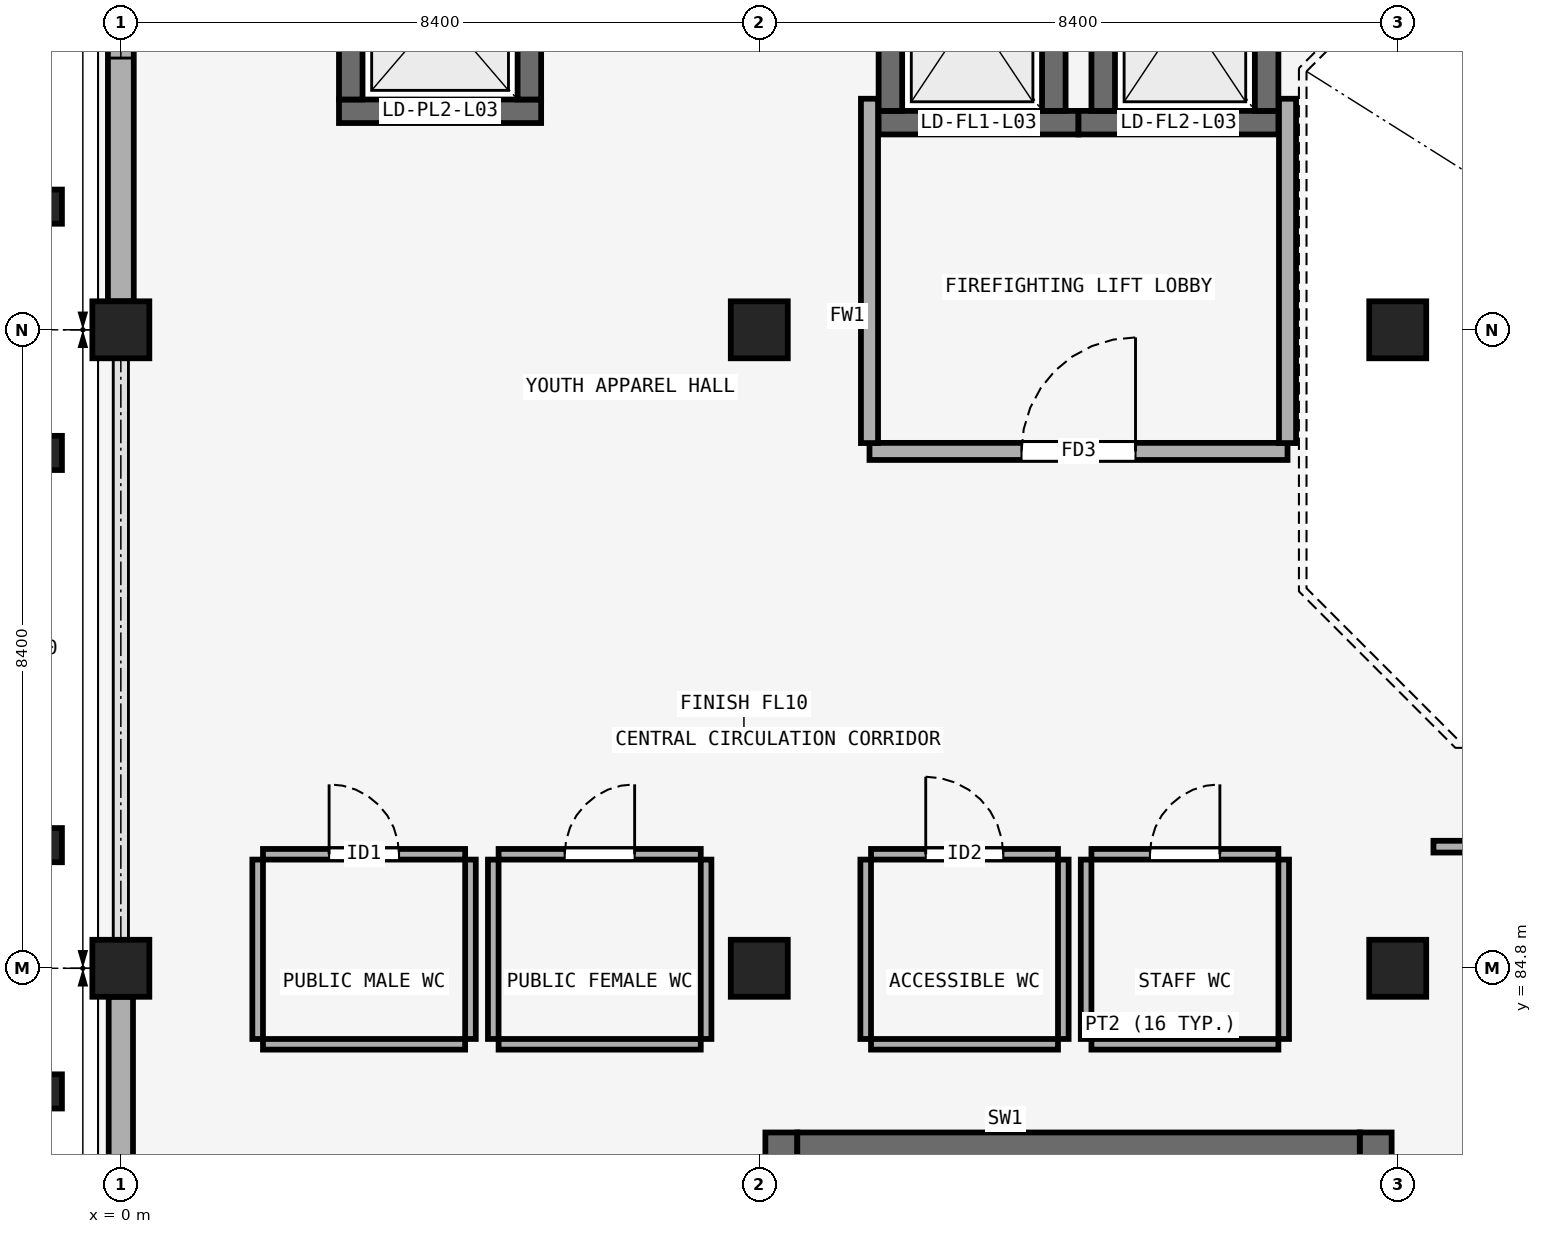
"""IFC4 building model, lengths in metres.
Left out: names, types, materials, properties, quantities, classifications, styles, units other than length and angle.
Written with IfcOpenShell. Run it as: python <this file> out.ifc"""

import sys

from ifc_helpers import new_model, si_unit, direction, frame, frame_2d, origin, origin_2d, place, context, subcontext, project, spatial, rectangle, extrude, element, fill, save


model = new_model("IFC4")
c1 = context("Model", 3, precision=1e-05, world=origin(), true_north=direction((0.0, 1.0)))
c2 = subcontext(c1, "Body", "Model", "MODEL_VIEW")
j1 = project(units=[si_unit("LENGTHUNIT", "METRE"), si_unit("PLANEANGLEUNIT", "RADIAN")], contexts=[c1])
p1 = place(None, origin())
s1 = spatial("IfcSite", under=j1, at=p1, CompositionType="ELEMENT")
p2 = place(p1, origin())
s2 = spatial("IfcBuilding", under=s1, at=p2, CompositionType="ELEMENT")
p3 = place(p2, frame((0.0, 0.0, 14.4)))
s3 = spatial("IfcBuildingStorey", under=s2, at=p3, CompositionType="ELEMENT", Elevation=14.4)
for number, where, z_axis, x_axis in (
    (1, (0.0, 84.8, 0.0), (0.0, 0.0, 1.0), (1.0, 0.0, 0.0)),
    (2, (8.4, 84.8, 0.0), (0.0, 0.0, 1.0), (1.0, 0.0, 0.0)),
    (3, (16.8, 84.8, 0.0), (0.0, 0.0, 1.0), (1.0, 0.0, 0.0)),
    (4, (0.0, 93.2, 0.0), (0.0, 0.0, 1.0), (1.0, 0.0, 0.0)),
    (5, (8.4, 93.2, 0.0), (0.0, 0.0, 1.0), (1.0, 0.0, 0.0)),
    (6, (16.8, 93.2, 0.0), (0.0, 0.0, 1.0), (1.0, 0.0, 0.0)),
):
    element("IfcColumn", number, at=place(p3, frame(where, z_axis=z_axis, x_axis=x_axis)), inside=s3, PredefinedType="COLUMN", context=c2, shape_type="SweptSolid", body=[
        extrude(rectangle(XDim=0.75, YDim=0.75, at=origin_2d()), origin(), (0.0, 0.0, 1.0), 4.5),
    ])
for number, where, z_axis, x_axis in (
    (7, (-1.05, 83.18, 0.0), (0.0, 0.0, 1.0), (0.0, 1.0, 0.0)),
    (8, (-1.05, 86.42, 0.0), (0.0, 0.0, 1.0), (0.0, 1.0, 0.0)),
    (9, (-1.05, 91.58, 0.0), (0.0, 0.0, 1.0), (0.0, 1.0, 0.0)),
    (10, (-1.05, 94.82, 0.0), (0.0, 0.0, 1.0), (0.0, 1.0, 0.0)),
):
    element("IfcColumn", number, at=place(p3, frame(where, z_axis=z_axis, x_axis=x_axis)), inside=s3, PredefinedType="PILASTER", context=c2, shape_type="SweptSolid", body=[
        extrude(rectangle(XDim=0.45, YDim=0.55, at=origin_2d()), origin(), (0.0, 0.0, 1.0), 4.5),
    ])
p4 = place(p3, frame((0.0, 76.775, 0.0), z_axis=(0.0, 0.0, 1.0), x_axis=(0.0, 1.0, 0.0)))
e11 = element("IfcWall", 11, at=p4, inside=s3, PredefinedType="SOLIDWALL", context=c2, shape_type="SweptSolid", body=[
    extrude(rectangle(XDim=7.65, YDim=0.32, at=frame_2d((3.825, 0.0))), origin(), (0.0, 0.0, 1.0), 3.45),
])
p5 = place(p4, frame((3.2, 0.0, 0.95)))
e12 = element("IfcOpeningElement", 12, at=p5, cuts=e11, PredefinedType="OPENING", context=c2, shape_type="SweptSolid", body=[
    extrude(rectangle(XDim=1.25, YDim=1.35, at=frame_2d((0.625, 0.675))), frame((0.0, 0.17, 0.0), z_axis=(0.0, -1.0, 0.0), x_axis=(1.0, 0.0, 0.0)), (0.0, 0.0, 1.0), 0.34),
])
p6 = place(p3, frame((0.0, 93.575, 0.0), z_axis=(0.0, 0.0, 1.0), x_axis=(0.0, 1.0, 0.0)))
e13 = element("IfcWall", 13, at=p6, inside=s3, PredefinedType="SOLIDWALL", context=c2, shape_type="SweptSolid", body=[
    extrude(rectangle(XDim=7.65, YDim=0.34, at=frame_2d((3.825, 0.0))), origin(), (0.0, 0.0, 1.0), 3.45),
])
p7 = place(p6, frame((3.2, 0.0, 0.95)))
e14 = element("IfcOpeningElement", 14, at=p7, cuts=e13, PredefinedType="OPENING", context=c2, shape_type="SweptSolid", body=[
    extrude(rectangle(XDim=1.25, YDim=1.6, at=frame_2d((0.625, 0.8))), frame((0.0, 0.18, 0.0), z_axis=(0.0, -1.0, 0.0), x_axis=(1.0, 0.0, 0.0)), (0.0, 0.0, 1.0), 0.36),
])
p8 = place(p3, frame((8.69, 82.64, 0.0), z_axis=(0.0, 0.0, 1.0), x_axis=(0.0, -1.0, 0.0)))
e15 = element("IfcWall", 15, at=p8, inside=s3, PredefinedType="SHEAR", context=c2, shape_type="SweptSolid", body=[
    extrude(rectangle(XDim=4.08, YDim=0.42, at=frame_2d((2.04, 0.0))), origin(), (0.0, 0.0, 1.0), 4.2),
])
p9 = place(p8, frame((1.315, 0.0, 0.0)))
e16 = element("IfcOpeningElement", 16, at=p9, cuts=e15, PredefinedType="OPENING", context=c2, shape_type="SweptSolid", body=[
    extrude(rectangle(XDim=1.45, YDim=2.2, at=frame_2d((0.725, 1.1))), frame((0.0, 0.22, 0.0), z_axis=(0.0, -1.0, 0.0), x_axis=(1.0, 0.0, 0.0)), (0.0, 0.0, 1.0), 0.44),
])
p10 = place(p3, frame((16.51, 78.56, 0.0), z_axis=(0.0, 0.0, 1.0), x_axis=(0.0, 1.0, 0.0)))
e17 = element("IfcWall", 17, at=p10, inside=s3, PredefinedType="SHEAR", context=c2, shape_type="SweptSolid", body=[
    extrude(rectangle(XDim=4.08, YDim=0.42, at=frame_2d((2.04, 0.0))), origin(), (0.0, 0.0, 1.0), 4.2),
])
p11 = place(p3, frame((8.9, 82.43, 0.0), z_axis=(0.0, 0.0, 1.0), x_axis=(1.0, 0.0, 0.0)))
e18 = element("IfcWall", 18, at=p11, inside=s3, PredefinedType="SHEAR", context=c2, shape_type="SweptSolid", body=[
    extrude(rectangle(XDim=7.4, YDim=0.42, at=frame_2d((3.7, 0.0))), origin(), (0.0, 0.0, 1.0), 4.2),
])
p12 = place(p3, frame((9.97, 95.925, 0.0), z_axis=(0.0, 0.0, 1.0), x_axis=(1.0, 0.0, 0.0)))
e19 = element("IfcWall", 19, at=p12, inside=s3, PredefinedType="SHEAR", context=c2, shape_type="SweptSolid", body=[
    extrude(rectangle(XDim=2.63, YDim=0.31, at=frame_2d((1.315, 0.0))), origin(), (0.0, 0.0, 1.0), 4.2),
])
p13 = place(p12, frame((0.715, 0.0, 0.0)))
e20 = element("IfcOpeningElement", 20, at=p13, cuts=e19, PredefinedType="OPENING", context=c2, shape_type="SweptSolid", body=[
    extrude(rectangle(XDim=1.2, YDim=2.25, at=frame_2d((0.6, 1.125))), frame((0.0, 0.165, 0.0), z_axis=(0.0, -1.0, 0.0), x_axis=(1.0, 0.0, 0.0)), (0.0, 0.0, 1.0), 0.33),
])
for number, where, z_axis, x_axis in (
    (21, (10.125, 96.08, 0.0), (0.0, 0.0, 1.0), (0.0, 1.0, 0.0)),
    (22, (12.275, 96.08, 0.0), (0.0, 0.0, 1.0), (0.0, 1.0, 0.0)),
):
    element("IfcWall", number, at=place(p3, frame(where, z_axis=z_axis, x_axis=x_axis)), inside=s3, PredefinedType="SHEAR", context=c2, shape_type="SweptSolid", body=[
        extrude(rectangle(XDim=2.64, YDim=0.31, at=frame_2d((1.32, 0.0))), origin(), (0.0, 0.0, 1.0), 4.2),
    ])
p14 = place(p3, frame((12.6, 95.925, 0.0), z_axis=(0.0, 0.0, 1.0), x_axis=(1.0, 0.0, 0.0)))
e23 = element("IfcWall", 23, at=p14, inside=s3, PredefinedType="SHEAR", context=c2, shape_type="SweptSolid", body=[
    extrude(rectangle(XDim=2.63, YDim=0.31, at=frame_2d((1.315, 0.0))), origin(), (0.0, 0.0, 1.0), 4.2),
])
p15 = place(p14, frame((0.715, 0.0, 0.0)))
e24 = element("IfcOpeningElement", 24, at=p15, cuts=e23, PredefinedType="OPENING", context=c2, shape_type="SweptSolid", body=[
    extrude(rectangle(XDim=1.2, YDim=2.25, at=frame_2d((0.6, 1.125))), frame((0.0, 0.165, 0.0), z_axis=(0.0, -1.0, 0.0), x_axis=(1.0, 0.0, 0.0)), (0.0, 0.0, 1.0), 0.33),
])
for number, where, z_axis, x_axis in (
    (25, (12.925, 96.08, 0.0), (0.0, 0.0, 1.0), (0.0, 1.0, 0.0)),
    (26, (15.075, 96.08, 0.0), (0.0, 0.0, 1.0), (0.0, 1.0, 0.0)),
):
    element("IfcWall", number, at=place(p3, frame(where, z_axis=z_axis, x_axis=x_axis)), inside=s3, PredefinedType="SHEAR", context=c2, shape_type="SweptSolid", body=[
        extrude(rectangle(XDim=2.64, YDim=0.31, at=frame_2d((1.32, 0.0))), origin(), (0.0, 0.0, 1.0), 4.2),
    ])
p16 = place(p3, frame((2.87, 96.075, 0.0), z_axis=(0.0, 0.0, 1.0), x_axis=(1.0, 0.0, 0.0)))
e27 = element("IfcWall", 27, at=p16, inside=s3, PredefinedType="SHEAR", context=c2, shape_type="SweptSolid", body=[
    extrude(rectangle(XDim=2.66, YDim=0.31, at=frame_2d((1.33, 0.0))), origin(), (0.0, 0.0, 1.0), 4.2),
])
p17 = place(p16, frame((0.78, 0.0, 0.0)))
e28 = element("IfcOpeningElement", 28, at=p17, cuts=e27, PredefinedType="OPENING", context=c2, shape_type="SweptSolid", body=[
    extrude(rectangle(XDim=1.1, YDim=2.2, at=frame_2d((0.55, 1.1))), frame((0.0, 0.165, 0.0), z_axis=(0.0, -1.0, 0.0), x_axis=(1.0, 0.0, 0.0)), (0.0, 0.0, 1.0), 0.33),
])
for number, where, z_axis, x_axis in (
    (29, (3.025, 96.23, 0.0), (0.0, 0.0, 1.0), (0.0, 1.0, 0.0)),
    (30, (5.375, 96.23, 0.0), (0.0, 0.0, 1.0), (0.0, 1.0, 0.0)),
):
    element("IfcWall", number, at=place(p3, frame(where, z_axis=z_axis, x_axis=x_axis)), inside=s3, PredefinedType="SHEAR", context=c2, shape_type="SweptSolid", body=[
        extrude(rectangle(XDim=2.34, YDim=0.31, at=frame_2d((1.17, 0.0))), origin(), (0.0, 0.0, 1.0), 4.2),
    ])
p18 = place(p3, frame((9.85, 91.6, 0.0), z_axis=(0.0, 0.0, 1.0), x_axis=(1.0, 0.0, 0.0)))
e31 = element("IfcWall", 31, at=p18, inside=s3, PredefinedType="PARTITIONING", context=c2, shape_type="SweptSolid", body=[
    extrude(rectangle(XDim=5.5, YDim=0.225, at=frame_2d((2.75, 0.0))), origin(), (0.0, 0.0, 1.0), 4.2),
])
p19 = place(p18, frame((2.0, 0.0, 0.0)))
e32 = element("IfcOpeningElement", 32, at=p19, cuts=e31, PredefinedType="OPENING", context=c2, shape_type="SweptSolid", body=[
    extrude(rectangle(XDim=1.5, YDim=2.25, at=frame_2d((0.75, 1.125))), frame((0.0, 0.123, 0.0), z_axis=(0.0, -1.0, 0.0), x_axis=(1.0, 0.0, 0.0)), (0.0, 0.0, 1.0), 0.245),
])
for number, where, z_axis, x_axis in (
    (33, (9.85, 91.71, 0.0), (0.0, 0.0, 1.0), (0.0, 1.0, 0.0)),
    (34, (15.35, 91.71, 0.0), (0.0, 0.0, 1.0), (0.0, 1.0, 0.0)),
):
    element("IfcWall", number, at=place(p3, frame(where, z_axis=z_axis, x_axis=x_axis)), inside=s3, PredefinedType="PARTITIONING", context=c2, shape_type="SweptSolid", body=[
        extrude(rectangle(XDim=4.53, YDim=0.225, at=frame_2d((2.265, 0.0))), origin(), (0.0, 0.0, 1.0), 3.5),
    ])
p20 = place(p3, frame((1.87, 86.3, 0.0), z_axis=(0.0, 0.0, 1.0), x_axis=(1.0, 0.0, 0.0)))
e35 = element("IfcWall", 35, at=p20, inside=s3, PredefinedType="PARTITIONING", context=c2, shape_type="SweptSolid", body=[
    extrude(rectangle(XDim=2.66, YDim=0.14, at=frame_2d((1.33, 0.0))), origin(), (0.0, 0.0, 1.0), 4.2),
])
p21 = place(p20, frame((0.87, 0.0, 0.0)))
e36 = element("IfcOpeningElement", 36, at=p21, cuts=e35, PredefinedType="OPENING", context=c2, shape_type="SweptSolid", body=[
    extrude(rectangle(XDim=0.92, YDim=2.12, at=frame_2d((0.46, 1.06))), frame((0.0, 0.08, 0.0), z_axis=(0.0, -1.0, 0.0), x_axis=(1.0, 0.0, 0.0)), (0.0, 0.0, 1.0), 0.16),
])
p22 = place(p3, frame((1.87, 83.8, 0.0), z_axis=(0.0, 0.0, 1.0), x_axis=(1.0, 0.0, 0.0)))
e37 = element("IfcWall", 37, at=p22, inside=s3, PredefinedType="PARTITIONING", context=c2, shape_type="SweptSolid", body=[
    extrude(rectangle(XDim=2.66, YDim=0.14, at=frame_2d((1.33, 0.0))), origin(), (0.0, 0.0, 1.0), 4.2),
])
for number, where, z_axis, x_axis in (
    (38, (1.8, 83.87, 0.0), (0.0, 0.0, 1.0), (0.0, 1.0, 0.0)),
    (39, (4.6, 83.87, 0.0), (0.0, 0.0, 1.0), (0.0, 1.0, 0.0)),
):
    element("IfcWall", number, at=place(p3, frame(where, z_axis=z_axis, x_axis=x_axis)), inside=s3, PredefinedType="PARTITIONING", context=c2, shape_type="SweptSolid", body=[
        extrude(rectangle(XDim=2.36, YDim=0.14, at=frame_2d((1.18, 0.0))), origin(), (0.0, 0.0, 1.0), 3.45),
    ])
p23 = place(p3, frame((4.97, 86.3, 0.0), z_axis=(0.0, 0.0, 1.0), x_axis=(1.0, 0.0, 0.0)))
e40 = element("IfcWall", 40, at=p23, inside=s3, PredefinedType="PARTITIONING", context=c2, shape_type="SweptSolid", body=[
    extrude(rectangle(XDim=2.66, YDim=0.14, at=frame_2d((1.33, 0.0))), origin(), (0.0, 0.0, 1.0), 4.2),
])
p24 = place(p23, frame((0.87, 0.0, 0.0)))
e41 = element("IfcOpeningElement", 41, at=p24, cuts=e40, PredefinedType="OPENING", context=c2, shape_type="SweptSolid", body=[
    extrude(rectangle(XDim=0.92, YDim=2.12, at=frame_2d((0.46, 1.06))), frame((0.0, 0.08, 0.0), z_axis=(0.0, -1.0, 0.0), x_axis=(1.0, 0.0, 0.0)), (0.0, 0.0, 1.0), 0.16),
])
p25 = place(p3, frame((4.97, 83.8, 0.0), z_axis=(0.0, 0.0, 1.0), x_axis=(1.0, 0.0, 0.0)))
e42 = element("IfcWall", 42, at=p25, inside=s3, PredefinedType="PARTITIONING", context=c2, shape_type="SweptSolid", body=[
    extrude(rectangle(XDim=2.66, YDim=0.14, at=frame_2d((1.33, 0.0))), origin(), (0.0, 0.0, 1.0), 4.2),
])
for number, where, z_axis, x_axis in (
    (43, (4.9, 83.87, 0.0), (0.0, 0.0, 1.0), (0.0, 1.0, 0.0)),
    (44, (7.7, 83.87, 0.0), (0.0, 0.0, 1.0), (0.0, 1.0, 0.0)),
):
    element("IfcWall", number, at=place(p3, frame(where, z_axis=z_axis, x_axis=x_axis)), inside=s3, PredefinedType="PARTITIONING", context=c2, shape_type="SweptSolid", body=[
        extrude(rectangle(XDim=2.36, YDim=0.14, at=frame_2d((1.18, 0.0))), origin(), (0.0, 0.0, 1.0), 3.45),
    ])
p26 = place(p3, frame((9.87, 86.3, 0.0), z_axis=(0.0, 0.0, 1.0), x_axis=(1.0, 0.0, 0.0)))
e45 = element("IfcWall", 45, at=p26, inside=s3, PredefinedType="PARTITIONING", context=c2, shape_type="SweptSolid", body=[
    extrude(rectangle(XDim=2.46, YDim=0.14, at=frame_2d((1.23, 0.0))), origin(), (0.0, 0.0, 1.0), 4.2),
])
p27 = place(p26, frame((0.72, 0.0, 0.0)))
e46 = element("IfcOpeningElement", 46, at=p27, cuts=e45, PredefinedType="OPENING", context=c2, shape_type="SweptSolid", body=[
    extrude(rectangle(XDim=1.02, YDim=2.15, at=frame_2d((0.51, 1.075))), frame((0.0, 0.08, 0.0), z_axis=(0.0, -1.0, 0.0), x_axis=(1.0, 0.0, 0.0)), (0.0, 0.0, 1.0), 0.16),
])
p28 = place(p3, frame((9.87, 83.8, 0.0), z_axis=(0.0, 0.0, 1.0), x_axis=(1.0, 0.0, 0.0)))
e47 = element("IfcWall", 47, at=p28, inside=s3, PredefinedType="PARTITIONING", context=c2, shape_type="SweptSolid", body=[
    extrude(rectangle(XDim=2.46, YDim=0.14, at=frame_2d((1.23, 0.0))), origin(), (0.0, 0.0, 1.0), 4.2),
])
for number, where, z_axis, x_axis in (
    (48, (9.8, 83.87, 0.0), (0.0, 0.0, 1.0), (0.0, 1.0, 0.0)),
    (49, (12.4, 83.87, 0.0), (0.0, 0.0, 1.0), (0.0, 1.0, 0.0)),
):
    element("IfcWall", number, at=place(p3, frame(where, z_axis=z_axis, x_axis=x_axis)), inside=s3, PredefinedType="PARTITIONING", context=c2, shape_type="SweptSolid", body=[
        extrude(rectangle(XDim=2.36, YDim=0.14, at=frame_2d((1.18, 0.0))), origin(), (0.0, 0.0, 1.0), 3.45),
    ])
p29 = place(p3, frame((12.77, 86.3, 0.0), z_axis=(0.0, 0.0, 1.0), x_axis=(1.0, 0.0, 0.0)))
e50 = element("IfcWall", 50, at=p29, inside=s3, PredefinedType="PARTITIONING", context=c2, shape_type="SweptSolid", body=[
    extrude(rectangle(XDim=2.46, YDim=0.14, at=frame_2d((1.23, 0.0))), origin(), (0.0, 0.0, 1.0), 4.2),
])
p30 = place(p29, frame((0.77, 0.0, 0.0)))
e51 = element("IfcOpeningElement", 51, at=p30, cuts=e50, PredefinedType="OPENING", context=c2, shape_type="SweptSolid", body=[
    extrude(rectangle(XDim=0.92, YDim=2.12, at=frame_2d((0.46, 1.06))), frame((0.0, 0.08, 0.0), z_axis=(0.0, -1.0, 0.0), x_axis=(1.0, 0.0, 0.0)), (0.0, 0.0, 1.0), 0.16),
])
p31 = place(p3, frame((12.77, 83.8, 0.0), z_axis=(0.0, 0.0, 1.0), x_axis=(1.0, 0.0, 0.0)))
e52 = element("IfcWall", 52, at=p31, inside=s3, PredefinedType="PARTITIONING", context=c2, shape_type="SweptSolid", body=[
    extrude(rectangle(XDim=2.46, YDim=0.14, at=frame_2d((1.23, 0.0))), origin(), (0.0, 0.0, 1.0), 4.2),
])
for number, where, z_axis, x_axis in (
    (53, (12.7, 83.87, 0.0), (0.0, 0.0, 1.0), (0.0, 1.0, 0.0)),
    (54, (15.3, 83.87, 0.0), (0.0, 0.0, 1.0), (0.0, 1.0, 0.0)),
):
    element("IfcWall", number, at=place(p3, frame(where, z_axis=z_axis, x_axis=x_axis)), inside=s3, PredefinedType="PARTITIONING", context=c2, shape_type="SweptSolid", body=[
        extrude(rectangle(XDim=2.36, YDim=0.14, at=frame_2d((1.18, 0.0))), origin(), (0.0, 0.0, 1.0), 3.45),
    ])
p32 = place(p3, frame((17.27, 86.4, 0.0), z_axis=(0.0, 0.0, 1.0), x_axis=(1.0, 0.0, 0.0)))
e55 = element("IfcWall", 55, at=p32, inside=s3, PredefinedType="PARTITIONING", context=c2, shape_type="SweptSolid", body=[
    extrude(rectangle(XDim=7.61, YDim=0.155, at=frame_2d((3.805, 0.0))), origin(), (0.0, 0.0, 1.0), 4.2),
])
p33 = place(p7, origin())
e56 = element("IfcWindow", 56, at=p33, inside=s3, PartitioningType="SINGLE_PANEL", PredefinedType="WINDOW", context=c2, shape_type="SweptSolid", body=[
    extrude(rectangle(XDim=1.25, YDim=1.6, at=frame_2d((0.625, 0.8))), frame((0.0, 0.03, 0.0), z_axis=(0.0, -1.0, 0.0), x_axis=(1.0, 0.0, 0.0)), (0.0, 0.0, 1.0), 0.06),
])
fill(e14, e56)
p34 = place(p13, origin())
e57 = element("IfcDoor", 57, at=p34, inside=s3, OperationType="SLIDING_TO_LEFT", PredefinedType="DOOR", context=c2, shape_type="SweptSolid", body=[
    extrude(rectangle(XDim=1.2, YDim=2.25, at=frame_2d((0.6, 1.125))), frame((0.0, 0.025, 0.0), z_axis=(0.0, -1.0, 0.0), x_axis=(1.0, 0.0, 0.0)), (0.0, 0.0, 1.0), 0.05),
])
fill(e20, e57)
p35 = place(p15, origin())
e58 = element("IfcDoor", 58, at=p35, inside=s3, OperationType="SLIDING_TO_LEFT", PredefinedType="DOOR", context=c2, shape_type="SweptSolid", body=[
    extrude(rectangle(XDim=1.2, YDim=2.25, at=frame_2d((0.6, 1.125))), frame((0.0, 0.025, 0.0), z_axis=(0.0, -1.0, 0.0), x_axis=(1.0, 0.0, 0.0)), (0.0, 0.0, 1.0), 0.05),
])
fill(e24, e58)
p36 = place(p17, origin())
e59 = element("IfcDoor", 59, at=p36, inside=s3, OperationType="SLIDING_TO_LEFT", PredefinedType="DOOR", context=c2, shape_type="SweptSolid", body=[
    extrude(rectangle(XDim=1.1, YDim=2.2, at=frame_2d((0.55, 1.1))), frame((0.0, 0.025, 0.0), z_axis=(0.0, -1.0, 0.0), x_axis=(1.0, 0.0, 0.0)), (0.0, 0.0, 1.0), 0.05),
])
fill(e28, e59)
p37 = place(p19, origin())
e60 = element("IfcDoor", 60, at=p37, inside=s3, OperationType="SINGLE_SWING_RIGHT", PredefinedType="DOOR", context=c2, shape_type="SweptSolid", body=[
    extrude(rectangle(XDim=1.5, YDim=2.25, at=frame_2d((0.75, 1.125))), frame((0.0, 0.025, 0.0), z_axis=(0.0, -1.0, 0.0), x_axis=(1.0, 0.0, 0.0)), (0.0, 0.0, 1.0), 0.05),
])
fill(e32, e60)
p38 = place(p21, origin())
e61 = element("IfcDoor", 61, at=p38, inside=s3, OperationType="SINGLE_SWING_LEFT", PredefinedType="DOOR", context=c2, shape_type="SweptSolid", body=[
    extrude(rectangle(XDim=0.92, YDim=2.12, at=frame_2d((0.46, 1.06))), frame((0.0, 0.025, 0.0), z_axis=(0.0, -1.0, 0.0), x_axis=(1.0, 0.0, 0.0)), (0.0, 0.0, 1.0), 0.05),
])
fill(e36, e61)
p39 = place(p24, origin())
e62 = element("IfcDoor", 62, at=p39, inside=s3, OperationType="SINGLE_SWING_RIGHT", PredefinedType="DOOR", context=c2, shape_type="SweptSolid", body=[
    extrude(rectangle(XDim=0.92, YDim=2.12, at=frame_2d((0.46, 1.06))), frame((0.0, 0.025, 0.0), z_axis=(0.0, -1.0, 0.0), x_axis=(1.0, 0.0, 0.0)), (0.0, 0.0, 1.0), 0.05),
])
fill(e41, e62)
p40 = place(p27, origin())
e63 = element("IfcDoor", 63, at=p40, inside=s3, OperationType="SINGLE_SWING_LEFT", PredefinedType="DOOR", context=c2, shape_type="SweptSolid", body=[
    extrude(rectangle(XDim=1.02, YDim=2.15, at=frame_2d((0.51, 1.075))), frame((0.0, 0.025, 0.0), z_axis=(0.0, -1.0, 0.0), x_axis=(1.0, 0.0, 0.0)), (0.0, 0.0, 1.0), 0.05),
])
fill(e46, e63)
p41 = place(p30, origin())
e64 = element("IfcDoor", 64, at=p41, inside=s3, OperationType="SINGLE_SWING_RIGHT", PredefinedType="DOOR", context=c2, shape_type="SweptSolid", body=[
    extrude(rectangle(XDim=0.92, YDim=2.12, at=frame_2d((0.46, 1.06))), frame((0.0, 0.025, 0.0), z_axis=(0.0, -1.0, 0.0), x_axis=(1.0, 0.0, 0.0)), (0.0, 0.0, 1.0), 0.05),
])
fill(e51, e64)
save(model, sys.argv[1])
